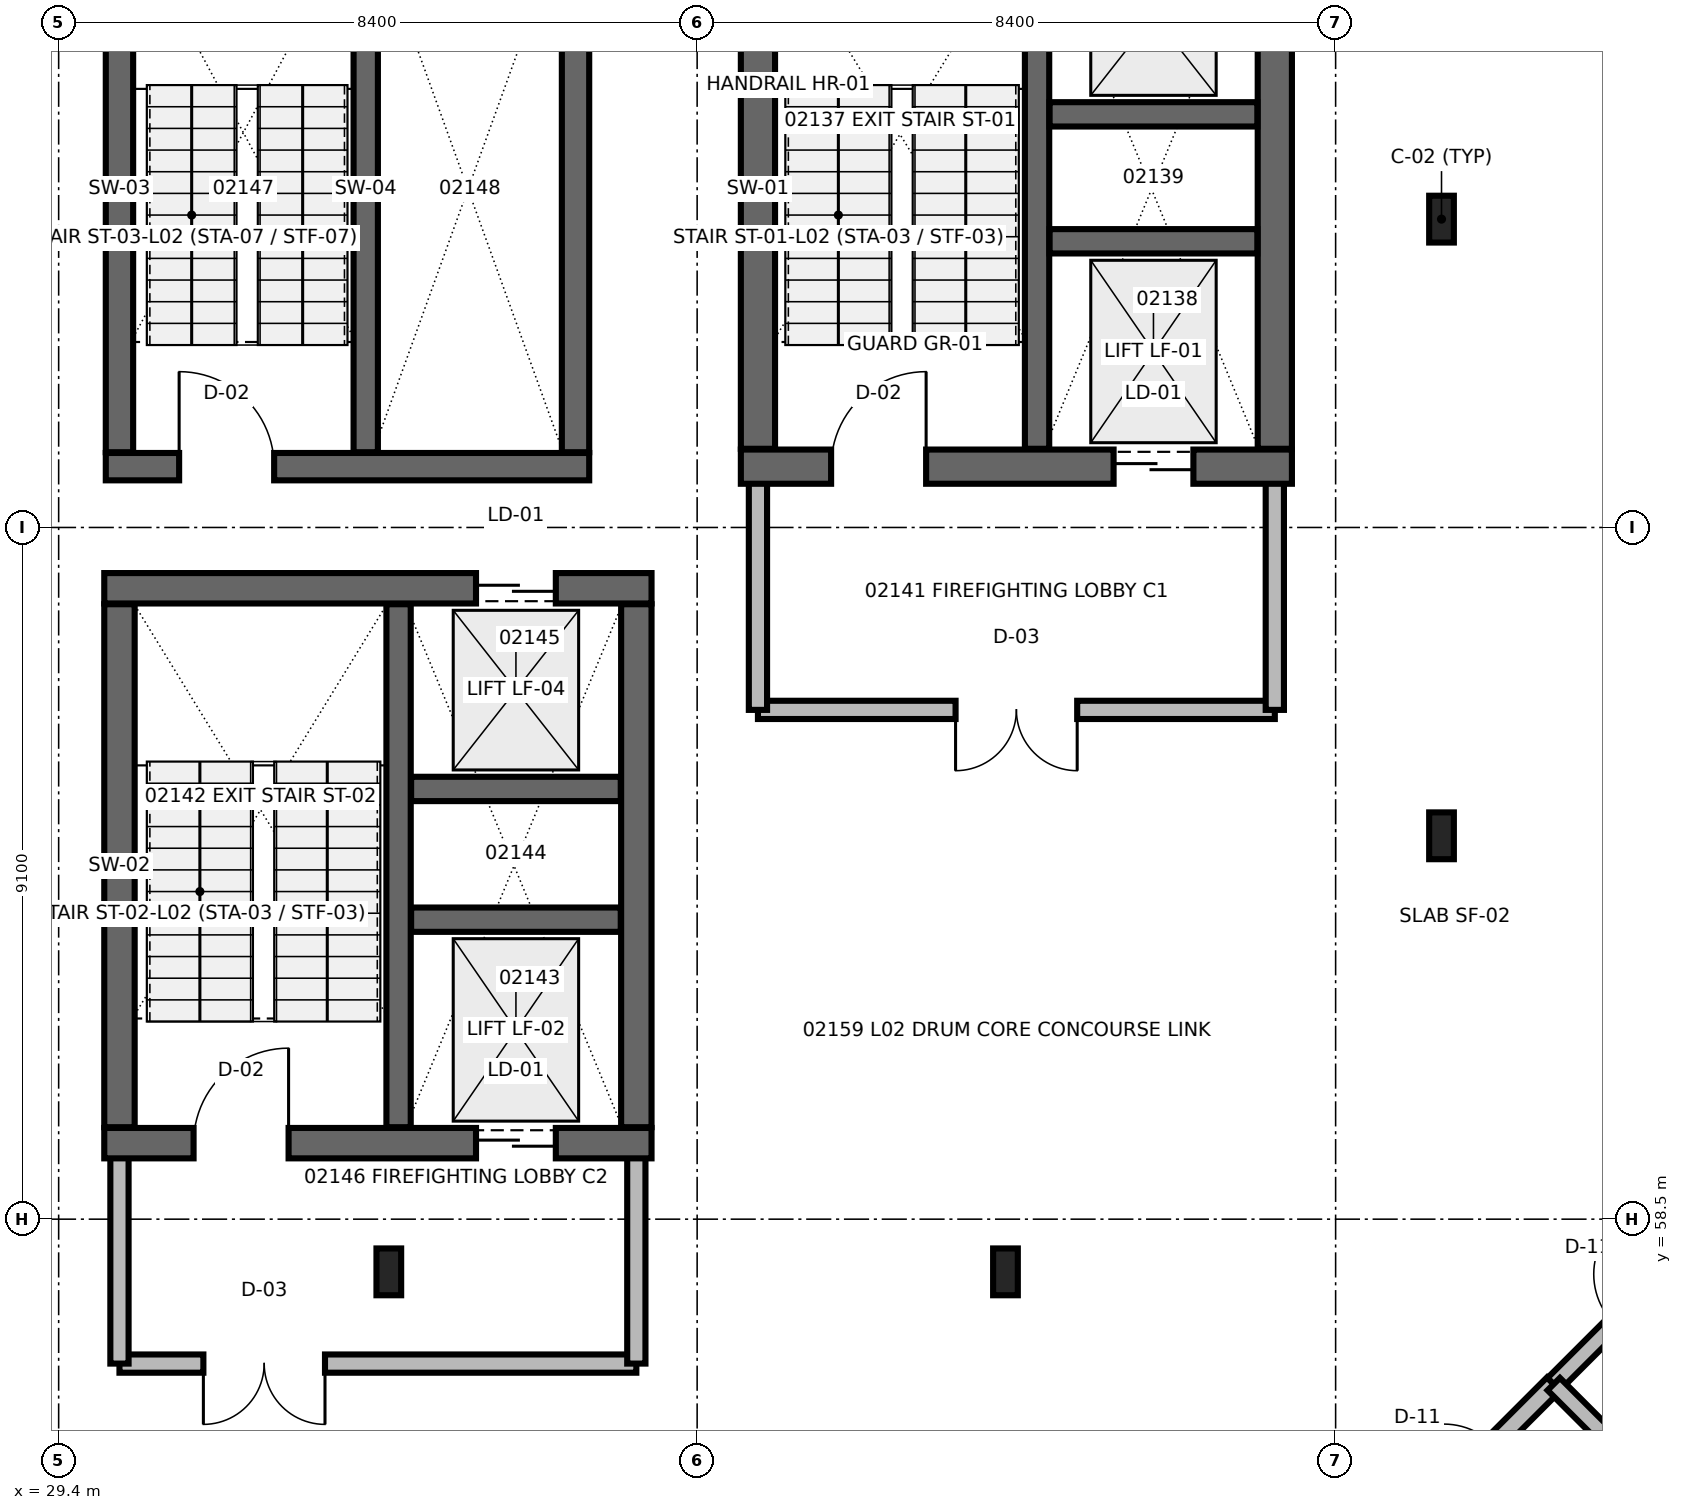
"""IFC4 building model, lengths in metres.
Left out: names, types, materials, properties, quantities, classifications, styles, units other than length and angle.
Written with IfcOpenShell. Run it as: python <this file> out.ifc"""

import sys

from ifc_helpers import new_model, si_unit, direction, frame, frame_2d, origin, origin_2d, place, context, subcontext, project, spatial, rectangle, i_section, extrude, element, fill, save


model = new_model("IFC4")
c1 = context("Model", 3, precision=1e-05, world=origin(), true_north=direction((0.0, 1.0)))
c2 = subcontext(c1, "Body", "Model", "MODEL_VIEW")
j1 = project(units=[si_unit("LENGTHUNIT", "METRE"), si_unit("PLANEANGLEUNIT", "RADIAN")], contexts=[c1])
p1 = place(None, origin())
s1 = spatial("IfcSite", under=j1, at=p1, CompositionType="ELEMENT")
p2 = place(p1, origin())
s2 = spatial("IfcBuilding", under=s1, at=p2, CompositionType="ELEMENT")
p3 = place(p2, frame((0.0, 0.0, 9.6)))
s3 = spatial("IfcBuildingStorey", under=s2, at=p3, CompositionType="ELEMENT", Elevation=9.6)
for number, where, z_axis, x_axis in (
    (1, (47.593, 71.656, 0.0), (0.0, 0.0, 1.0), (1.0, 0.0, 0.0)),
    (2, (33.744, 57.807, 0.0), (0.0, 0.0, 1.0), (1.0, 0.0, 0.0)),
    (3, (41.856, 57.807, 0.0), (0.0, 0.0, 1.0), (1.0, 0.0, 0.0)),
    (4, (47.593, 63.544, 0.0), (0.0, 0.0, 1.0), (1.0, 0.0, 0.0)),
):
    element("IfcColumn", number, at=place(p3, frame(where, z_axis=z_axis, x_axis=x_axis)), inside=s3, PredefinedType="COLUMN", context=c2, shape_type="SweptSolid", body=[
        extrude(i_section(OverallWidth=0.325, OverallDepth=0.616, WebThickness=0.014, FlangeThickness=0.021, at=origin_2d()), origin(), (0.0, 0.0, 1.0), 4.2),
    ])
p4 = place(p3, frame((49.405, 49.673, 0.0), z_axis=(0.0, 0.0, 1.0), x_axis=(0.707106781187, 0.707106781187, 0.0)))
e5 = element("IfcWall", 5, at=p4, inside=s3, PredefinedType="SOLIDWALL", context=c2, shape_type="SweptSolid", body=[
    extrude(rectangle(XDim=8.602, YDim=0.26, at=frame_2d((4.301, 0.0))), origin(), (0.0, 0.0, 1.0), 1.48),
])
p5 = place(p3, frame((38.6, 65.2, 0.0), z_axis=(0.0, 0.0, 1.0), x_axis=(1.0, 0.0, 0.0)))
e6 = element("IfcWall", 6, at=p5, inside=s3, PredefinedType="SOLIDWALL", context=c2, shape_type="SweptSolid", body=[
    extrude(rectangle(XDim=6.8, YDim=0.24, at=frame_2d((3.4, 0.0))), origin(), (0.0, 0.0, 1.0), 3.92),
])
p6 = place(p5, frame((2.6, 0.0, 0.0)))
e7 = element("IfcOpeningElement", 7, at=p6, cuts=e6, PredefinedType="OPENING", context=c2, shape_type="SweptSolid", body=[
    extrude(rectangle(XDim=1.6, YDim=2.2, at=frame_2d((0.8, 1.1))), frame((0.0, 0.13, 0.0), z_axis=(0.0, -1.0, 0.0), x_axis=(1.0, 0.0, 0.0)), (0.0, 0.0, 1.0), 0.26),
])
for number, where, z_axis, x_axis in (
    (8, (38.6, 68.4, 0.0), (0.0, 0.0, 1.0), (0.0, -1.0, 0.0)),
    (9, (45.4, 65.2, 0.0), (0.0, 0.0, 1.0), (0.0, 1.0, 0.0)),
):
    element("IfcWall", number, at=place(p3, frame(where, z_axis=z_axis, x_axis=x_axis)), inside=s3, PredefinedType="SOLIDWALL", context=c2, shape_type="SweptSolid", body=[
        extrude(rectangle(XDim=3.2, YDim=0.24, at=frame_2d((1.6, 0.0))), origin(), (0.0, 0.0, 1.0), 3.92),
    ])
p7 = place(p3, frame((38.375, 68.4, 0.0), z_axis=(0.0, 0.0, 1.0), x_axis=(1.0, 0.0, 0.0)))
e10 = element("IfcWall", 10, at=p7, inside=s3, PredefinedType="SHEAR", context=c2, shape_type="SweptSolid", body=[
    extrude(rectangle(XDim=7.25, YDim=0.45, at=frame_2d((3.625, 0.0))), origin(), (0.0, 0.0, 1.0), 3.92),
])
p8 = place(p7, frame((1.188, 0.0, 0.0)))
e11 = element("IfcOpeningElement", 11, at=p8, cuts=e10, PredefinedType="OPENING", context=c2, shape_type="SweptSolid", body=[
    extrude(rectangle(XDim=1.25, YDim=2.2, at=frame_2d((0.625, 1.1))), frame((0.0, 0.235, 0.0), z_axis=(0.0, -1.0, 0.0), x_axis=(1.0, 0.0, 0.0)), (0.0, 0.0, 1.0), 0.47),
])
p9 = place(p7, frame((4.904, 0.0, 0.0)))
e12 = element("IfcOpeningElement", 12, at=p9, cuts=e10, PredefinedType="OPENING", context=c2, shape_type="SweptSolid", body=[
    extrude(rectangle(XDim=1.05, YDim=2.15, at=frame_2d((0.525, 1.075))), frame((0.0, 0.235, 0.0), z_axis=(0.0, -1.0, 0.0), x_axis=(1.0, 0.0, 0.0)), (0.0, 0.0, 1.0), 0.47),
])
for number, where, z_axis, x_axis in (
    (13, (38.6, 68.635, 0.0), (0.0, 0.0, 1.0), (0.0, 1.0, 0.0)),
    (14, (45.4, 68.635, 0.0), (0.0, 0.0, 1.0), (0.0, 1.0, 0.0)),
):
    element("IfcWall", number, at=place(p3, frame(where, z_axis=z_axis, x_axis=x_axis)), inside=s3, PredefinedType="SHEAR", context=c2, shape_type="SweptSolid", body=[
        extrude(rectangle(XDim=6.83, YDim=0.45, at=frame_2d((3.415, 0.0))), origin(), (0.0, 0.0, 1.0), 3.92),
    ])
p10 = place(p3, frame((42.272, 68.635, 0.0), z_axis=(0.0, 0.0, 1.0), x_axis=(0.0, 1.0, 0.0)))
e15 = element("IfcWall", 15, at=p10, inside=s3, PredefinedType="SHEAR", context=c2, shape_type="SweptSolid", body=[
    extrude(rectangle(XDim=6.83, YDim=0.32, at=frame_2d((3.415, 0.0))), origin(), (0.0, 0.0, 1.0), 3.92),
])
for number, where, z_axis, x_axis in (
    (16, (42.437, 71.365, 0.0), (0.0, 0.0, 1.0), (1.0, 0.0, 0.0)),
    (17, (42.437, 73.035, 0.0), (0.0, 0.0, 1.0), (1.0, 0.0, 0.0)),
):
    element("IfcWall", number, at=place(p3, frame(where, z_axis=z_axis, x_axis=x_axis)), inside=s3, PredefinedType="SHEAR", context=c2, shape_type="SweptSolid", body=[
        extrude(rectangle(XDim=2.733, YDim=0.32, at=frame_2d((1.366, 0.0))), origin(), (0.0, 0.0, 1.0), 3.92),
    ])
p11 = place(p3, frame((30.2, 56.6, 0.0), z_axis=(0.0, 0.0, 1.0), x_axis=(1.0, 0.0, 0.0)))
e18 = element("IfcWall", 18, at=p11, inside=s3, PredefinedType="SOLIDWALL", context=c2, shape_type="SweptSolid", body=[
    extrude(rectangle(XDim=6.8, YDim=0.24, at=frame_2d((3.4, 0.0))), origin(), (0.0, 0.0, 1.0), 3.304),
])
p12 = place(p11, frame((1.104, 0.0, 0.0)))
e19 = element("IfcOpeningElement", 19, at=p12, cuts=e18, PredefinedType="OPENING", context=c2, shape_type="SweptSolid", body=[
    extrude(rectangle(XDim=1.6, YDim=2.2, at=frame_2d((0.8, 1.1))), frame((0.0, 0.13, 0.0), z_axis=(0.0, -1.0, 0.0), x_axis=(1.0, 0.0, 0.0)), (0.0, 0.0, 1.0), 0.26),
])
p13 = place(p3, frame((30.2, 59.5, 0.0), z_axis=(0.0, 0.0, 1.0), x_axis=(0.0, -1.0, 0.0)))
e20 = element("IfcWall", 20, at=p13, inside=s3, PredefinedType="SOLIDWALL", context=c2, shape_type="SweptSolid", body=[
    extrude(rectangle(XDim=2.9, YDim=0.24, at=frame_2d((1.45, 0.0))), origin(), (0.0, 0.0, 1.0), 3.92),
])
p14 = place(p3, frame((37.0, 56.6, 0.0), z_axis=(0.0, 0.0, 1.0), x_axis=(0.0, 1.0, 0.0)))
e21 = element("IfcWall", 21, at=p14, inside=s3, PredefinedType="SOLIDWALL", context=c2, shape_type="SweptSolid", body=[
    extrude(rectangle(XDim=2.9, YDim=0.24, at=frame_2d((1.45, 0.0))), origin(), (0.0, 0.0, 1.0), 3.304),
])
p15 = place(p3, frame((30.0, 59.5, 0.0), z_axis=(0.0, 0.0, 1.0), x_axis=(1.0, 0.0, 0.0)))
e22 = element("IfcWall", 22, at=p15, inside=s3, PredefinedType="SHEAR", context=c2, shape_type="SweptSolid", body=[
    extrude(rectangle(XDim=7.2, YDim=0.4, at=frame_2d((3.6, 0.0))), origin(), (0.0, 0.0, 1.0), 3.92),
])
p16 = place(p15, frame((1.175, 0.0, 0.0)))
e23 = element("IfcOpeningElement", 23, at=p16, cuts=e22, PredefinedType="OPENING", context=c2, shape_type="SweptSolid", body=[
    extrude(rectangle(XDim=1.25, YDim=2.2, at=frame_2d((0.625, 1.1))), frame((0.0, 0.21, 0.0), z_axis=(0.0, -1.0, 0.0), x_axis=(1.0, 0.0, 0.0)), (0.0, 0.0, 1.0), 0.42),
])
p17 = place(p15, frame((4.891, 0.0, 0.0)))
e24 = element("IfcOpeningElement", 24, at=p17, cuts=e22, PredefinedType="OPENING", context=c2, shape_type="SweptSolid", body=[
    extrude(rectangle(XDim=1.05, YDim=2.15, at=frame_2d((0.525, 1.075))), frame((0.0, 0.21, 0.0), z_axis=(0.0, -1.0, 0.0), x_axis=(1.0, 0.0, 0.0)), (0.0, 0.0, 1.0), 0.42),
])
p18 = place(p3, frame((30.0, 66.8, 0.0), z_axis=(0.0, 0.0, 1.0), x_axis=(1.0, 0.0, 0.0)))
e25 = element("IfcWall", 25, at=p18, inside=s3, PredefinedType="SHEAR", context=c2, shape_type="SweptSolid", body=[
    extrude(rectangle(XDim=7.2, YDim=0.4, at=frame_2d((3.6, 0.0))), origin(), (0.0, 0.0, 1.0), 3.92),
])
p19 = place(p18, frame((4.891, 0.0, 0.0)))
e26 = element("IfcOpeningElement", 26, at=p19, cuts=e25, PredefinedType="OPENING", context=c2, shape_type="SweptSolid", body=[
    extrude(rectangle(XDim=1.05, YDim=2.15, at=frame_2d((0.525, 1.075))), frame((0.0, 0.21, 0.0), z_axis=(0.0, -1.0, 0.0), x_axis=(1.0, 0.0, 0.0)), (0.0, 0.0, 1.0), 0.42),
])
for number, where, z_axis, x_axis in (
    (27, (30.2, 59.71, 0.0), (0.0, 0.0, 1.0), (0.0, 1.0, 0.0)),
    (28, (37.0, 59.71, 0.0), (0.0, 0.0, 1.0), (0.0, 1.0, 0.0)),
):
    element("IfcWall", number, at=place(p3, frame(where, z_axis=z_axis, x_axis=x_axis)), inside=s3, PredefinedType="SHEAR", context=c2, shape_type="SweptSolid", body=[
        extrude(rectangle(XDim=6.88, YDim=0.4, at=frame_2d((3.44, 0.0))), origin(), (0.0, 0.0, 1.0), 3.92),
    ])
p20 = place(p3, frame((33.872, 59.71, 0.0), z_axis=(0.0, 0.0, 1.0), x_axis=(0.0, 1.0, 0.0)))
e29 = element("IfcWall", 29, at=p20, inside=s3, PredefinedType="SHEAR", context=c2, shape_type="SweptSolid", body=[
    extrude(rectangle(XDim=6.88, YDim=0.32, at=frame_2d((3.44, 0.0))), origin(), (0.0, 0.0, 1.0), 3.92),
])
for number, where, z_axis, x_axis in (
    (30, (34.037, 62.44, 0.0), (0.0, 0.0, 1.0), (1.0, 0.0, 0.0)),
    (31, (34.037, 64.16, 0.0), (0.0, 0.0, 1.0), (1.0, 0.0, 0.0)),
):
    element("IfcWall", number, at=place(p3, frame(where, z_axis=z_axis, x_axis=x_axis)), inside=s3, PredefinedType="SHEAR", context=c2, shape_type="SweptSolid", body=[
        extrude(rectangle(XDim=2.758, YDim=0.32, at=frame_2d((1.379, 0.0))), origin(), (0.0, 0.0, 1.0), 3.92),
    ])
p21 = place(p3, frame((30.02, 68.4, 0.0), z_axis=(0.0, 0.0, 1.0), x_axis=(1.0, 0.0, 0.0)))
e32 = element("IfcWall", 32, at=p21, inside=s3, PredefinedType="SHEAR", context=c2, shape_type="SweptSolid", body=[
    extrude(rectangle(XDim=6.36, YDim=0.36, at=frame_2d((3.18, 0.0))), origin(), (0.0, 0.0, 1.0), 3.92),
])
p22 = place(p21, frame((0.965, 0.0, 0.0)))
e33 = element("IfcOpeningElement", 33, at=p22, cuts=e32, PredefinedType="OPENING", context=c2, shape_type="SweptSolid", body=[
    extrude(rectangle(XDim=1.25, YDim=2.2, at=frame_2d((0.625, 1.1))), frame((0.0, 0.19, 0.0), z_axis=(0.0, -1.0, 0.0), x_axis=(1.0, 0.0, 0.0)), (0.0, 0.0, 1.0), 0.38),
])
for number, where, z_axis, x_axis in (
    (34, (30.2, 68.59, 0.0), (0.0, 0.0, 1.0), (0.0, 1.0, 0.0)),
    (35, (36.2, 68.59, 0.0), (0.0, 0.0, 1.0), (0.0, 1.0, 0.0)),
):
    element("IfcWall", number, at=place(p3, frame(where, z_axis=z_axis, x_axis=x_axis)), inside=s3, PredefinedType="SHEAR", context=c2, shape_type="SweptSolid", body=[
        extrude(rectangle(XDim=6.92, YDim=0.36, at=frame_2d((3.46, 0.0))), origin(), (0.0, 0.0, 1.0), 3.92),
    ])
p23 = place(p3, frame((33.44, 68.59, 0.0), z_axis=(0.0, 0.0, 1.0), x_axis=(0.0, 1.0, 0.0)))
e36 = element("IfcWall", 36, at=p23, inside=s3, PredefinedType="SHEAR", context=c2, shape_type="SweptSolid", body=[
    extrude(rectangle(XDim=6.92, YDim=0.32, at=frame_2d((3.46, 0.0))), origin(), (0.0, 0.0, 1.0), 3.92),
])
p24 = place(p3, frame((46.828, 54.089, 0.0), z_axis=(0.0, 0.0, 1.0), x_axis=(0.707106781187, 0.707106781187, 0.0)))
e37 = element("IfcWall", 37, at=p24, inside=s3, PredefinedType="PLUMBINGWALL", context=c2, shape_type="SweptSolid", body=[
    extrude(rectangle(XDim=3.17, YDim=0.25, at=frame_2d((1.585, 0.0))), origin(), (0.0, 0.0, 1.0), 3.304),
])
p25 = place(p24, frame((1.125, 0.0, 0.0)))
e38 = element("IfcOpeningElement", 38, at=p25, cuts=e37, PredefinedType="OPENING", context=c2, shape_type="SweptSolid", body=[
    extrude(rectangle(XDim=0.92, YDim=2.1, at=frame_2d((0.46, 1.05))), frame((0.0, 0.135, 0.0), z_axis=(0.0, -1.0, 0.0), x_axis=(1.0, 0.0, 0.0)), (0.0, 0.0, 1.0), 0.27),
])
p26 = place(p3, frame((49.07, 56.33, 0.0), z_axis=(0.0, 0.0, 1.0), x_axis=(0.707106781187, 0.707106781187, 0.0)))
e39 = element("IfcWall", 39, at=p26, inside=s3, PredefinedType="PLUMBINGWALL", context=c2, shape_type="SweptSolid", body=[
    extrude(rectangle(XDim=3.17, YDim=0.23, at=frame_2d((1.585, 0.0))), origin(), (0.0, 0.0, 1.0), 3.92),
])
p27 = place(p26, frame((1.125, 0.0, 0.0)))
e40 = element("IfcOpeningElement", 40, at=p27, cuts=e39, PredefinedType="OPENING", context=c2, shape_type="SweptSolid", body=[
    extrude(rectangle(XDim=0.92, YDim=2.1, at=frame_2d((0.46, 1.05))), frame((0.0, 0.125, 0.0), z_axis=(0.0, -1.0, 0.0), x_axis=(1.0, 0.0, 0.0)), (0.0, 0.0, 1.0), 0.25),
])
p28 = place(p3, frame((48.05, 52.26, 0.0), z_axis=(0.0, 0.0, 1.0), x_axis=(0.707123738387, 0.707089823579, 0.0)))
e41 = element("IfcWall", 41, at=p28, inside=s3, PredefinedType="PLUMBINGWALL", context=c2, shape_type="SweptSolid", body=[
    extrude(rectangle(XDim=7.199, YDim=0.25, at=frame_2d((3.599, 0.0))), origin(), (0.0, 0.0, 1.0), 3.444),
])
p29 = place(p3, frame((49.07, 56.33, 0.0), z_axis=(0.0, 0.0, 1.0), x_axis=(0.707106781187, -0.707106781187, 0.0)))
e42 = element("IfcWall", 42, at=p29, inside=s3, PredefinedType="PLUMBINGWALL", context=c2, shape_type="SweptSolid", body=[
    extrude(rectangle(XDim=2.158, YDim=0.23, at=frame_2d((1.079, 0.0))), origin(), (0.0, 0.0, 1.0), 3.444),
])
p30 = place(p6, frame((1.6, 0.0, 0.0), z_axis=(0.0, 0.0, 1.0), x_axis=(-1.0, 0.0, 0.0)))
e43 = element("IfcDoor", 43, at=p30, inside=s3, OperationType="DOUBLE_DOOR_SINGLE_SWING", PredefinedType="DOOR", context=c2, shape_type="SweptSolid", body=[
    extrude(rectangle(XDim=1.6, YDim=2.2, at=frame_2d((0.8, 1.1))), frame((0.0, 0.025, 0.0), z_axis=(0.0, -1.0, 0.0), x_axis=(1.0, 0.0, 0.0)), (0.0, 0.0, 1.0), 0.05),
])
fill(e7, e43)
p31 = place(p8, frame((1.25, 0.0, 0.0), z_axis=(0.0, 0.0, 1.0), x_axis=(-1.0, 0.0, 0.0)))
e44 = element("IfcDoor", 44, at=p31, inside=s3, OperationType="SINGLE_SWING_LEFT", PredefinedType="DOOR", context=c2, shape_type="SweptSolid", body=[
    extrude(rectangle(XDim=1.25, YDim=2.2, at=frame_2d((0.625, 1.1))), frame((0.0, 0.025, 0.0), z_axis=(0.0, -1.0, 0.0), x_axis=(1.0, 0.0, 0.0)), (0.0, 0.0, 1.0), 0.05),
])
fill(e11, e44)
p32 = place(p9, frame((1.05, 0.0, 0.0), z_axis=(0.0, 0.0, 1.0), x_axis=(-1.0, 0.0, 0.0)))
e45 = element("IfcDoor", 45, at=p32, inside=s3, OperationType="DOUBLE_DOOR_SLIDING", PredefinedType="DOOR", context=c2, shape_type="SweptSolid", body=[
    extrude(rectangle(XDim=1.05, YDim=2.15, at=frame_2d((0.525, 1.075))), frame((0.0, 0.025, 0.0), z_axis=(0.0, -1.0, 0.0), x_axis=(1.0, 0.0, 0.0)), (0.0, 0.0, 1.0), 0.05),
])
fill(e12, e45)
p33 = place(p12, frame((1.6, 0.0, 0.0), z_axis=(0.0, 0.0, 1.0), x_axis=(-1.0, 0.0, 0.0)))
e46 = element("IfcDoor", 46, at=p33, inside=s3, OperationType="DOUBLE_DOOR_SINGLE_SWING", PredefinedType="DOOR", context=c2, shape_type="SweptSolid", body=[
    extrude(rectangle(XDim=1.6, YDim=2.2, at=frame_2d((0.8, 1.1))), frame((0.0, 0.025, 0.0), z_axis=(0.0, -1.0, 0.0), x_axis=(1.0, 0.0, 0.0)), (0.0, 0.0, 1.0), 0.05),
])
fill(e19, e46)
p34 = place(p16, frame((1.25, 0.0, 0.0), z_axis=(0.0, 0.0, 1.0), x_axis=(-1.0, 0.0, 0.0)))
e47 = element("IfcDoor", 47, at=p34, inside=s3, OperationType="SINGLE_SWING_LEFT", PredefinedType="DOOR", context=c2, shape_type="SweptSolid", body=[
    extrude(rectangle(XDim=1.25, YDim=2.2, at=frame_2d((0.625, 1.1))), frame((0.0, 0.025, 0.0), z_axis=(0.0, -1.0, 0.0), x_axis=(1.0, 0.0, 0.0)), (0.0, 0.0, 1.0), 0.05),
])
fill(e23, e47)
p35 = place(p17, frame((1.05, 0.0, 0.0), z_axis=(0.0, 0.0, 1.0), x_axis=(-1.0, 0.0, 0.0)))
e48 = element("IfcDoor", 48, at=p35, inside=s3, OperationType="DOUBLE_DOOR_SLIDING", PredefinedType="DOOR", context=c2, shape_type="SweptSolid", body=[
    extrude(rectangle(XDim=1.05, YDim=2.15, at=frame_2d((0.525, 1.075))), frame((0.0, 0.025, 0.0), z_axis=(0.0, -1.0, 0.0), x_axis=(1.0, 0.0, 0.0)), (0.0, 0.0, 1.0), 0.05),
])
fill(e24, e48)
p36 = place(p19, origin())
e49 = element("IfcDoor", 49, at=p36, inside=s3, OperationType="DOUBLE_DOOR_SLIDING", PredefinedType="DOOR", context=c2, shape_type="SweptSolid", body=[
    extrude(rectangle(XDim=1.05, YDim=2.15, at=frame_2d((0.525, 1.075))), frame((0.0, 0.025, 0.0), z_axis=(0.0, -1.0, 0.0), x_axis=(1.0, 0.0, 0.0)), (0.0, 0.0, 1.0), 0.05),
])
fill(e26, e49)
p37 = place(p22, frame((1.25, 0.0, 0.0), z_axis=(0.0, 0.0, 1.0), x_axis=(-1.0, 0.0, 0.0)))
e50 = element("IfcDoor", 50, at=p37, inside=s3, OperationType="SINGLE_SWING_RIGHT", PredefinedType="DOOR", context=c2, shape_type="SweptSolid", body=[
    extrude(rectangle(XDim=1.25, YDim=2.2, at=frame_2d((0.625, 1.1))), frame((0.0, 0.025, 0.0), z_axis=(0.0, -1.0, 0.0), x_axis=(1.0, 0.0, 0.0)), (0.0, 0.0, 1.0), 0.05),
])
fill(e33, e50)
save(model, sys.argv[1])
